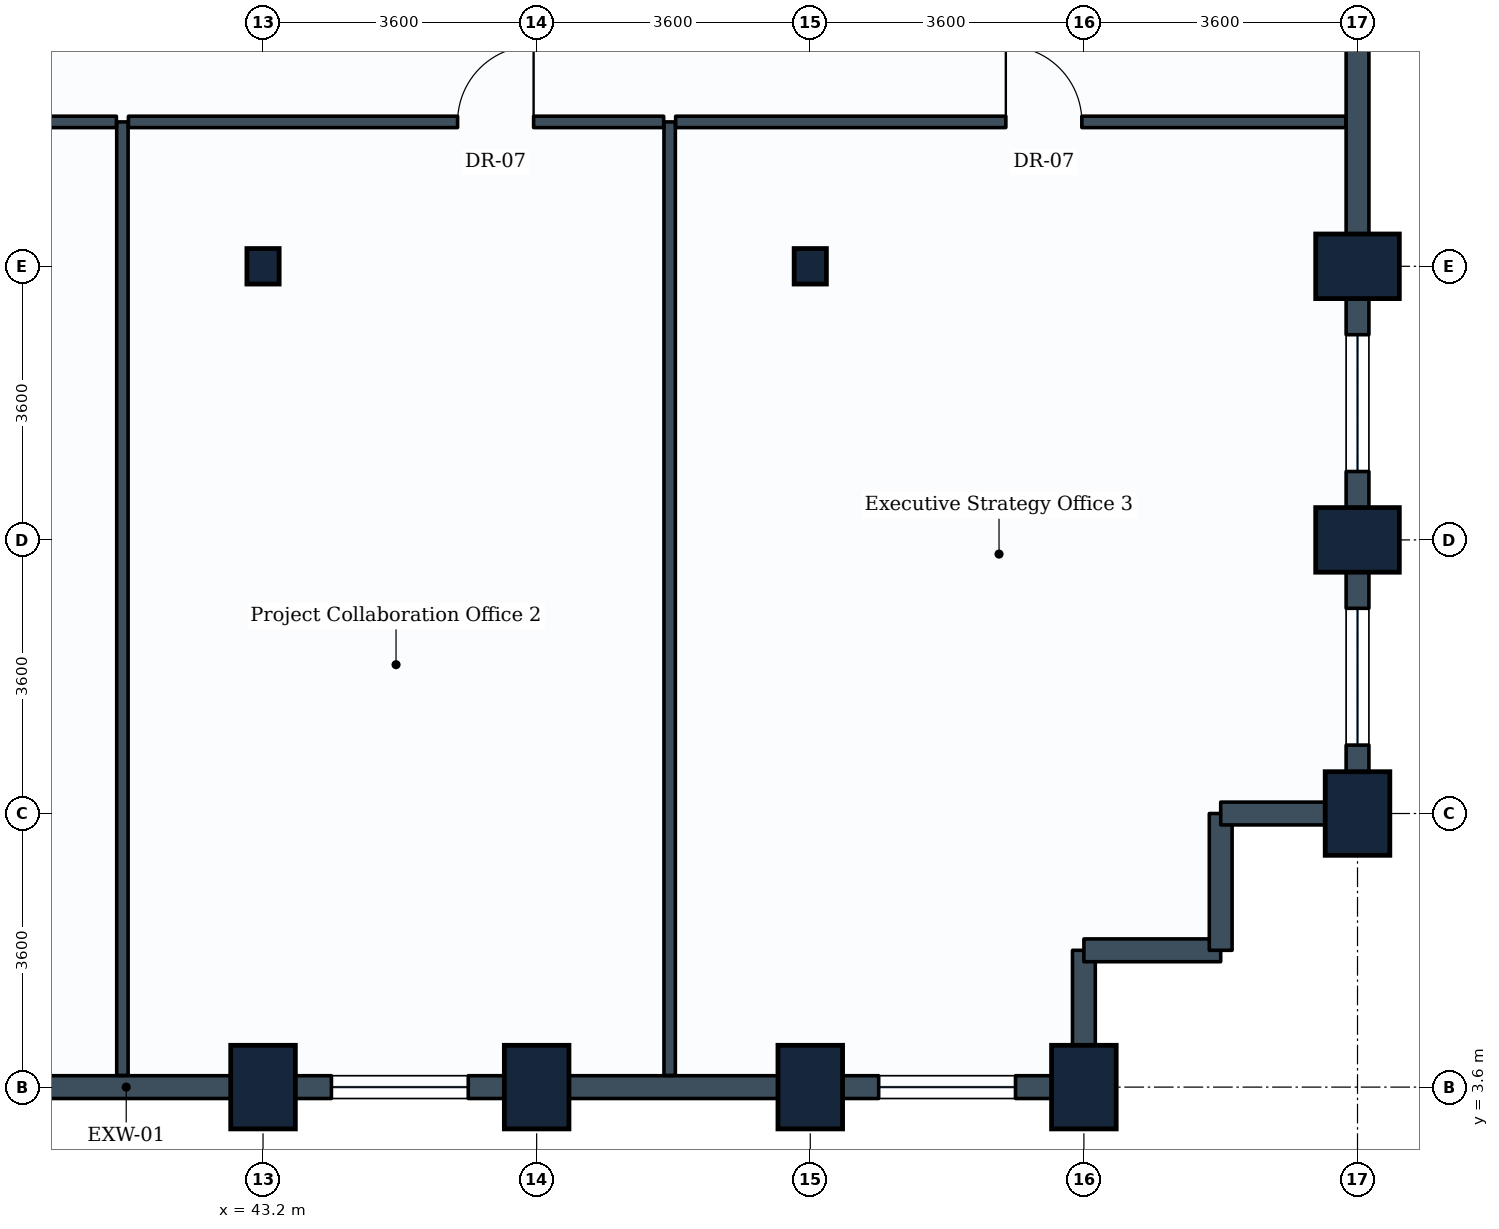
"""IFC4 building model, lengths in metres.
Left out: names, types, materials, properties, quantities, classifications, styles, units other than length and angle.
Written with IfcOpenShell. Run it as: python <this file> out.ifc"""

import sys

from ifc_helpers import new_model, si_unit, direction, frame, frame_2d, origin, origin_2d, place, context, subcontext, project, spatial, rectangle, i_section, extrude, element, fill, save


model = new_model("IFC4")
c1 = context("Model", 3, precision=1e-05, world=origin(), true_north=direction((0.0, 1.0)))
c2 = subcontext(c1, "Body", "Model", "MODEL_VIEW")
j1 = project(units=[si_unit("LENGTHUNIT", "METRE"), si_unit("PLANEANGLEUNIT", "RADIAN")], contexts=[c1])
p1 = place(None, origin())
s1 = spatial("IfcSite", under=j1, at=p1, CompositionType="ELEMENT")
p2 = place(p1, origin())
s2 = spatial("IfcBuilding", under=s1, at=p2, CompositionType="ELEMENT")
p3 = place(p2, frame((0.0, 0.0, 111.3)))
s3 = spatial("IfcBuildingStorey", under=s2, at=p3, CompositionType="ELEMENT", Elevation=111.3)
p4 = place(p3, frame((43.2, 3.6, 0.0), z_axis=(0.0, 0.0, 1.0), x_axis=(1.0, 0.0, 0.0)))
e1 = element("IfcColumn", 1, at=p4, inside=s3, PredefinedType="COLUMN", context=c2, shape_type="SweptSolid", body=[
    extrude(rectangle(XDim=0.85, YDim=1.1, at=origin_2d()), origin(), (0.0, 0.0, 1.0), 3.9),
])
p5 = place(p3, frame((43.2, 14.4, 0.0), z_axis=(0.0, 0.0, 1.0), x_axis=(1.0, 0.0, 0.0)))
e2 = element("IfcColumn", 2, at=p5, inside=s3, PredefinedType="COLUMN", context=c2, shape_type="SweptSolid", body=[
    extrude(i_section(OverallWidth=0.424, OverallDepth=0.467, WebThickness=0.033, FlangeThickness=0.053, FilletRadius=0.015, at=origin_2d()), origin(), (0.0, 0.0, 1.0), 3.9),
])
for number, where, z_axis, x_axis in (
    (3, (46.8, 3.6, 0.0), (0.0, 0.0, 1.0), (1.0, 0.0, 0.0)),
    (4, (50.4, 3.6, 0.0), (0.0, 0.0, 1.0), (1.0, 0.0, 0.0)),
):
    element("IfcColumn", number, at=place(p3, frame(where, z_axis=z_axis, x_axis=x_axis)), inside=s3, PredefinedType="COLUMN", context=c2, shape_type="SweptSolid", body=[
        extrude(rectangle(XDim=0.85, YDim=1.1, at=origin_2d()), origin(), (0.0, 0.0, 1.0), 3.9),
    ])
p6 = place(p3, frame((50.4, 14.4, 0.0), z_axis=(0.0, 0.0, 1.0), x_axis=(1.0, 0.0, 0.0)))
e5 = element("IfcColumn", 5, at=p6, inside=s3, PredefinedType="COLUMN", context=c2, shape_type="SweptSolid", body=[
    extrude(i_section(OverallWidth=0.424, OverallDepth=0.467, WebThickness=0.033, FlangeThickness=0.053, FilletRadius=0.015, at=origin_2d()), origin(), (0.0, 0.0, 1.0), 3.9),
])
for number, where, z_axis, x_axis in (
    (6, (54.0, 3.6, 0.0), (0.0, 0.0, 1.0), (1.0, 0.0, 0.0)),
    (7, (57.6, 7.2, 0.0), (0.0, 0.0, 1.0), (1.0, 0.0, 0.0)),
    (8, (57.6, 10.8, 0.0), (0.0, 0.0, 1.0), (0.0, 1.0, 0.0)),
    (9, (57.6, 14.4, 0.0), (0.0, 0.0, 1.0), (0.0, 1.0, 0.0)),
):
    element("IfcColumn", number, at=place(p3, frame(where, z_axis=z_axis, x_axis=x_axis)), inside=s3, PredefinedType="COLUMN", context=c2, shape_type="SweptSolid", body=[
        extrude(rectangle(XDim=0.85, YDim=1.1, at=origin_2d()), origin(), (0.0, 0.0, 1.0), 3.9),
    ])
p7 = place(p3, frame((43.2, 3.6, 0.0), z_axis=(0.0, 0.0, 1.0), x_axis=(-1.0, 0.0, 0.0)))
e10 = element("IfcWall", 10, at=p7, inside=s3, PredefinedType="STANDARD", context=c2, shape_type="SweptSolid", body=[
    extrude(rectangle(XDim=3.6, YDim=0.3, at=frame_2d((1.8, 0.0))), origin(), (0.0, 0.0, 1.0), 3.03),
])
p8 = place(p3, frame((46.8, 3.6, 0.0), z_axis=(0.0, 0.0, 1.0), x_axis=(-1.0, 0.0, 0.0)))
e11 = element("IfcWall", 11, at=p8, inside=s3, PredefinedType="STANDARD", context=c2, shape_type="SweptSolid", body=[
    extrude(rectangle(XDim=3.6, YDim=0.3, at=frame_2d((1.8, 0.0))), origin(), (0.0, 0.0, 1.0), 3.03),
])
p9 = place(p8, frame((0.9, 0.0, 0.85)))
e12 = element("IfcOpeningElement", 12, at=p9, cuts=e11, PredefinedType="OPENING", context=c2, shape_type="SweptSolid", body=[
    extrude(rectangle(XDim=1.8, YDim=1.35, at=frame_2d((0.9, 0.675))), frame((0.0, 0.16, 0.0), z_axis=(0.0, -1.0, 0.0), x_axis=(1.0, 0.0, 0.0)), (0.0, 0.0, 1.0), 0.32),
])
p10 = place(p3, frame((50.4, 3.6, 0.0), z_axis=(0.0, 0.0, 1.0), x_axis=(-1.0, 0.0, 0.0)))
e13 = element("IfcWall", 13, at=p10, inside=s3, PredefinedType="STANDARD", context=c2, shape_type="SweptSolid", body=[
    extrude(rectangle(XDim=3.6, YDim=0.3, at=frame_2d((1.8, 0.0))), origin(), (0.0, 0.0, 1.0), 3.03),
])
p11 = place(p3, frame((54.0, 3.6, 0.0), z_axis=(0.0, 0.0, 1.0), x_axis=(-1.0, 0.0, 0.0)))
e14 = element("IfcWall", 14, at=p11, inside=s3, PredefinedType="STANDARD", context=c2, shape_type="SweptSolid", body=[
    extrude(rectangle(XDim=3.6, YDim=0.3, at=frame_2d((1.8, 0.0))), origin(), (0.0, 0.0, 1.0), 3.03),
])
p12 = place(p11, frame((0.9, 0.0, 0.85)))
e15 = element("IfcOpeningElement", 15, at=p12, cuts=e14, PredefinedType="OPENING", context=c2, shape_type="SweptSolid", body=[
    extrude(rectangle(XDim=1.8, YDim=1.35, at=frame_2d((0.9, 0.675))), frame((0.0, 0.16, 0.0), z_axis=(0.0, -1.0, 0.0), x_axis=(1.0, 0.0, 0.0)), (0.0, 0.0, 1.0), 0.32),
])
p13 = place(p3, frame((54.0, 5.4, 0.0), z_axis=(0.0, 0.0, 1.0), x_axis=(0.0, -1.0, 0.0)))
e16 = element("IfcWall", 16, at=p13, inside=s3, PredefinedType="STANDARD", context=c2, shape_type="SweptSolid", body=[
    extrude(rectangle(XDim=1.8, YDim=0.3, at=frame_2d((0.9, 0.0))), origin(), (0.0, 0.0, 1.0), 3.03),
])
for number, where, z_axis, x_axis in (
    (17, (55.8, 5.4, 0.0), (0.0, 0.0, 1.0), (-1.0, 0.0, 0.0)),
    (18, (55.8, 7.2, 0.0), (0.0, 0.0, 1.0), (0.0, -1.0, 0.0)),
):
    element("IfcWall", number, at=place(p3, frame(where, z_axis=z_axis, x_axis=x_axis)), inside=s3, PredefinedType="STANDARD", context=c2, shape_type="SweptSolid", body=[
        extrude(rectangle(XDim=1.8, YDim=0.3, at=frame_2d((0.9, 0.0))), origin(), (0.0, 0.0, 1.0), 3.565),
    ])
p14 = place(p3, frame((57.6, 7.2, 0.0), z_axis=(0.0, 0.0, 1.0), x_axis=(-1.0, 0.0, 0.0)))
e19 = element("IfcWall", 19, at=p14, inside=s3, PredefinedType="STANDARD", context=c2, shape_type="SweptSolid", body=[
    extrude(rectangle(XDim=1.8, YDim=0.3, at=frame_2d((0.9, 0.0))), origin(), (0.0, 0.0, 1.0), 3.03),
])
p15 = place(p3, frame((57.6, 10.8, 0.0), z_axis=(0.0, 0.0, 1.0), x_axis=(0.0, -1.0, 0.0)))
e20 = element("IfcWall", 20, at=p15, inside=s3, PredefinedType="STANDARD", context=c2, shape_type="SweptSolid", body=[
    extrude(rectangle(XDim=3.6, YDim=0.3, at=frame_2d((1.8, 0.0))), origin(), (0.0, 0.0, 1.0), 3.03),
])
p16 = place(p15, frame((0.9, 0.0, 0.85)))
e21 = element("IfcOpeningElement", 21, at=p16, cuts=e20, PredefinedType="OPENING", context=c2, shape_type="SweptSolid", body=[
    extrude(rectangle(XDim=1.8, YDim=1.35, at=frame_2d((0.9, 0.675))), frame((0.0, 0.16, 0.0), z_axis=(0.0, -1.0, 0.0), x_axis=(1.0, 0.0, 0.0)), (0.0, 0.0, 1.0), 0.32),
])
p17 = place(p3, frame((57.6, 14.4, 0.0), z_axis=(0.0, 0.0, 1.0), x_axis=(0.0, -1.0, 0.0)))
e22 = element("IfcWall", 22, at=p17, inside=s3, PredefinedType="STANDARD", context=c2, shape_type="SweptSolid", body=[
    extrude(rectangle(XDim=3.6, YDim=0.3, at=frame_2d((1.8, 0.0))), origin(), (0.0, 0.0, 1.0), 3.03),
])
p18 = place(p17, frame((0.9, 0.0, 0.85)))
e23 = element("IfcOpeningElement", 23, at=p18, cuts=e22, PredefinedType="OPENING", context=c2, shape_type="SweptSolid", body=[
    extrude(rectangle(XDim=1.8, YDim=1.35, at=frame_2d((0.9, 0.675))), frame((0.0, 0.16, 0.0), z_axis=(0.0, -1.0, 0.0), x_axis=(1.0, 0.0, 0.0)), (0.0, 0.0, 1.0), 0.32),
])
p19 = place(p3, frame((57.6, 18.0, 0.0), z_axis=(0.0, 0.0, 1.0), x_axis=(0.0, -1.0, 0.0)))
e24 = element("IfcWall", 24, at=p19, inside=s3, PredefinedType="STANDARD", context=c2, shape_type="SweptSolid", body=[
    extrude(rectangle(XDim=3.6, YDim=0.3, at=frame_2d((1.8, 0.0))), origin(), (0.0, 0.0, 1.0), 3.03),
])
p20 = place(p3, frame((41.35, 3.754, 0.0), z_axis=(0.0, 0.0, 1.0), x_axis=(0.0, 1.0, 0.0)))
e25 = element("IfcWall", 25, at=p20, inside=s3, PredefinedType="PARTITIONING", context=c2, shape_type="SweptSolid", body=[
    extrude(rectangle(XDim=12.546, YDim=0.15, at=frame_2d((6.273, 0.0))), origin(), (0.0, 0.0, 1.0), 3.03),
])
p21 = place(p3, frame((34.479, 16.3, 0.0), z_axis=(0.0, 0.0, 1.0), x_axis=(1.0, 0.0, 0.0)))
e26 = element("IfcWall", 26, at=p21, inside=s3, PredefinedType="PARTITIONING", context=c2, shape_type="SweptSolid", body=[
    extrude(rectangle(XDim=6.792, YDim=0.15, at=frame_2d((3.396, 0.0))), origin(), (0.0, 0.0, 1.0), 3.11),
])
p22 = place(p21, frame((2.896, 0.0, 0.0)))
e27 = element("IfcOpeningElement", 27, at=p22, cuts=e26, PredefinedType="OPENING", context=c2, shape_type="SweptSolid", body=[
    extrude(rectangle(XDim=1.0, YDim=2.1, at=frame_2d((0.5, 1.05))), frame((0.0, 0.085, 0.0), z_axis=(0.0, -1.0, 0.0), x_axis=(1.0, 0.0, 0.0)), (0.0, 0.0, 1.0), 0.17),
])
p23 = place(p3, frame((48.55, 3.754, 0.0), z_axis=(0.0, 0.0, 1.0), x_axis=(0.0, 1.0, 0.0)))
e28 = element("IfcWall", 28, at=p23, inside=s3, PredefinedType="PARTITIONING", context=c2, shape_type="SweptSolid", body=[
    extrude(rectangle(XDim=12.546, YDim=0.15, at=frame_2d((6.273, 0.0))), origin(), (0.0, 0.0, 1.0), 3.03),
])
p24 = place(p3, frame((41.429, 16.3, 0.0), z_axis=(0.0, 0.0, 1.0), x_axis=(1.0, 0.0, 0.0)))
e29 = element("IfcWall", 29, at=p24, inside=s3, PredefinedType="PARTITIONING", context=c2, shape_type="SweptSolid", body=[
    extrude(rectangle(XDim=7.042, YDim=0.15, at=frame_2d((3.521, 0.0))), origin(), (0.0, 0.0, 1.0), 3.12),
])
p25 = place(p24, frame((4.331, 0.0, 0.0)))
e30 = element("IfcOpeningElement", 30, at=p25, cuts=e29, PredefinedType="OPENING", context=c2, shape_type="SweptSolid", body=[
    extrude(rectangle(XDim=1.0, YDim=2.1, at=frame_2d((0.5, 1.05))), frame((0.0, 0.085, 0.0), z_axis=(0.0, -1.0, 0.0), x_axis=(1.0, 0.0, 0.0)), (0.0, 0.0, 1.0), 0.17),
])
p26 = place(p3, frame((48.629, 16.3, 0.0), z_axis=(0.0, 0.0, 1.0), x_axis=(1.0, 0.0, 0.0)))
e31 = element("IfcWall", 31, at=p26, inside=s3, PredefinedType="PARTITIONING", context=c2, shape_type="SweptSolid", body=[
    extrude(rectangle(XDim=8.817, YDim=0.15, at=frame_2d((4.409, 0.0))), origin(), (0.0, 0.0, 1.0), 3.03),
])
p27 = place(p26, frame((4.344, 0.0, 0.0)))
e32 = element("IfcOpeningElement", 32, at=p27, cuts=e31, PredefinedType="OPENING", context=c2, shape_type="SweptSolid", body=[
    extrude(rectangle(XDim=1.0, YDim=2.1, at=frame_2d((0.5, 1.05))), frame((0.0, 0.085, 0.0), z_axis=(0.0, -1.0, 0.0), x_axis=(1.0, 0.0, 0.0)), (0.0, 0.0, 1.0), 0.17),
])
p28 = place(p9, origin())
e33 = element("IfcWindow", 33, at=p28, inside=s3, PartitioningType="SINGLE_PANEL", PredefinedType="WINDOW", context=c2, shape_type="SweptSolid", body=[
    extrude(rectangle(XDim=1.8, YDim=1.35, at=frame_2d((0.9, 0.675))), frame((0.0, 0.03, 0.0), z_axis=(0.0, -1.0, 0.0), x_axis=(1.0, 0.0, 0.0)), (0.0, 0.0, 1.0), 0.06),
])
fill(e12, e33)
p29 = place(p12, origin())
e34 = element("IfcWindow", 34, at=p29, inside=s3, PartitioningType="SINGLE_PANEL", PredefinedType="WINDOW", context=c2, shape_type="SweptSolid", body=[
    extrude(rectangle(XDim=1.8, YDim=1.35, at=frame_2d((0.9, 0.675))), frame((0.0, 0.03, 0.0), z_axis=(0.0, -1.0, 0.0), x_axis=(1.0, 0.0, 0.0)), (0.0, 0.0, 1.0), 0.06),
])
fill(e15, e34)
p30 = place(p16, origin())
e35 = element("IfcWindow", 35, at=p30, inside=s3, PartitioningType="SINGLE_PANEL", PredefinedType="WINDOW", context=c2, shape_type="SweptSolid", body=[
    extrude(rectangle(XDim=1.8, YDim=1.35, at=frame_2d((0.9, 0.675))), frame((0.0, 0.03, 0.0), z_axis=(0.0, -1.0, 0.0), x_axis=(1.0, 0.0, 0.0)), (0.0, 0.0, 1.0), 0.06),
])
fill(e21, e35)
p31 = place(p18, origin())
e36 = element("IfcWindow", 36, at=p31, inside=s3, PartitioningType="SINGLE_PANEL", PredefinedType="WINDOW", context=c2, shape_type="SweptSolid", body=[
    extrude(rectangle(XDim=1.8, YDim=1.35, at=frame_2d((0.9, 0.675))), frame((0.0, 0.03, 0.0), z_axis=(0.0, -1.0, 0.0), x_axis=(1.0, 0.0, 0.0)), (0.0, 0.0, 1.0), 0.06),
])
fill(e23, e36)
p32 = place(p25, origin())
e37 = element("IfcDoor", 37, at=p32, inside=s3, OperationType="SINGLE_SWING_RIGHT", PredefinedType="DOOR", context=c2, shape_type="SweptSolid", body=[
    extrude(rectangle(XDim=1.0, YDim=2.1, at=frame_2d((0.5, 1.05))), frame((0.0, 0.025, 0.0), z_axis=(0.0, -1.0, 0.0), x_axis=(1.0, 0.0, 0.0)), (0.0, 0.0, 1.0), 0.05),
])
fill(e30, e37)
p33 = place(p27, origin())
e38 = element("IfcDoor", 38, at=p33, inside=s3, OperationType="SINGLE_SWING_LEFT", PredefinedType="DOOR", context=c2, shape_type="SweptSolid", body=[
    extrude(rectangle(XDim=1.0, YDim=2.1, at=frame_2d((0.5, 1.05))), frame((0.0, 0.025, 0.0), z_axis=(0.0, -1.0, 0.0), x_axis=(1.0, 0.0, 0.0)), (0.0, 0.0, 1.0), 0.05),
])
fill(e32, e38)
save(model, sys.argv[1])
